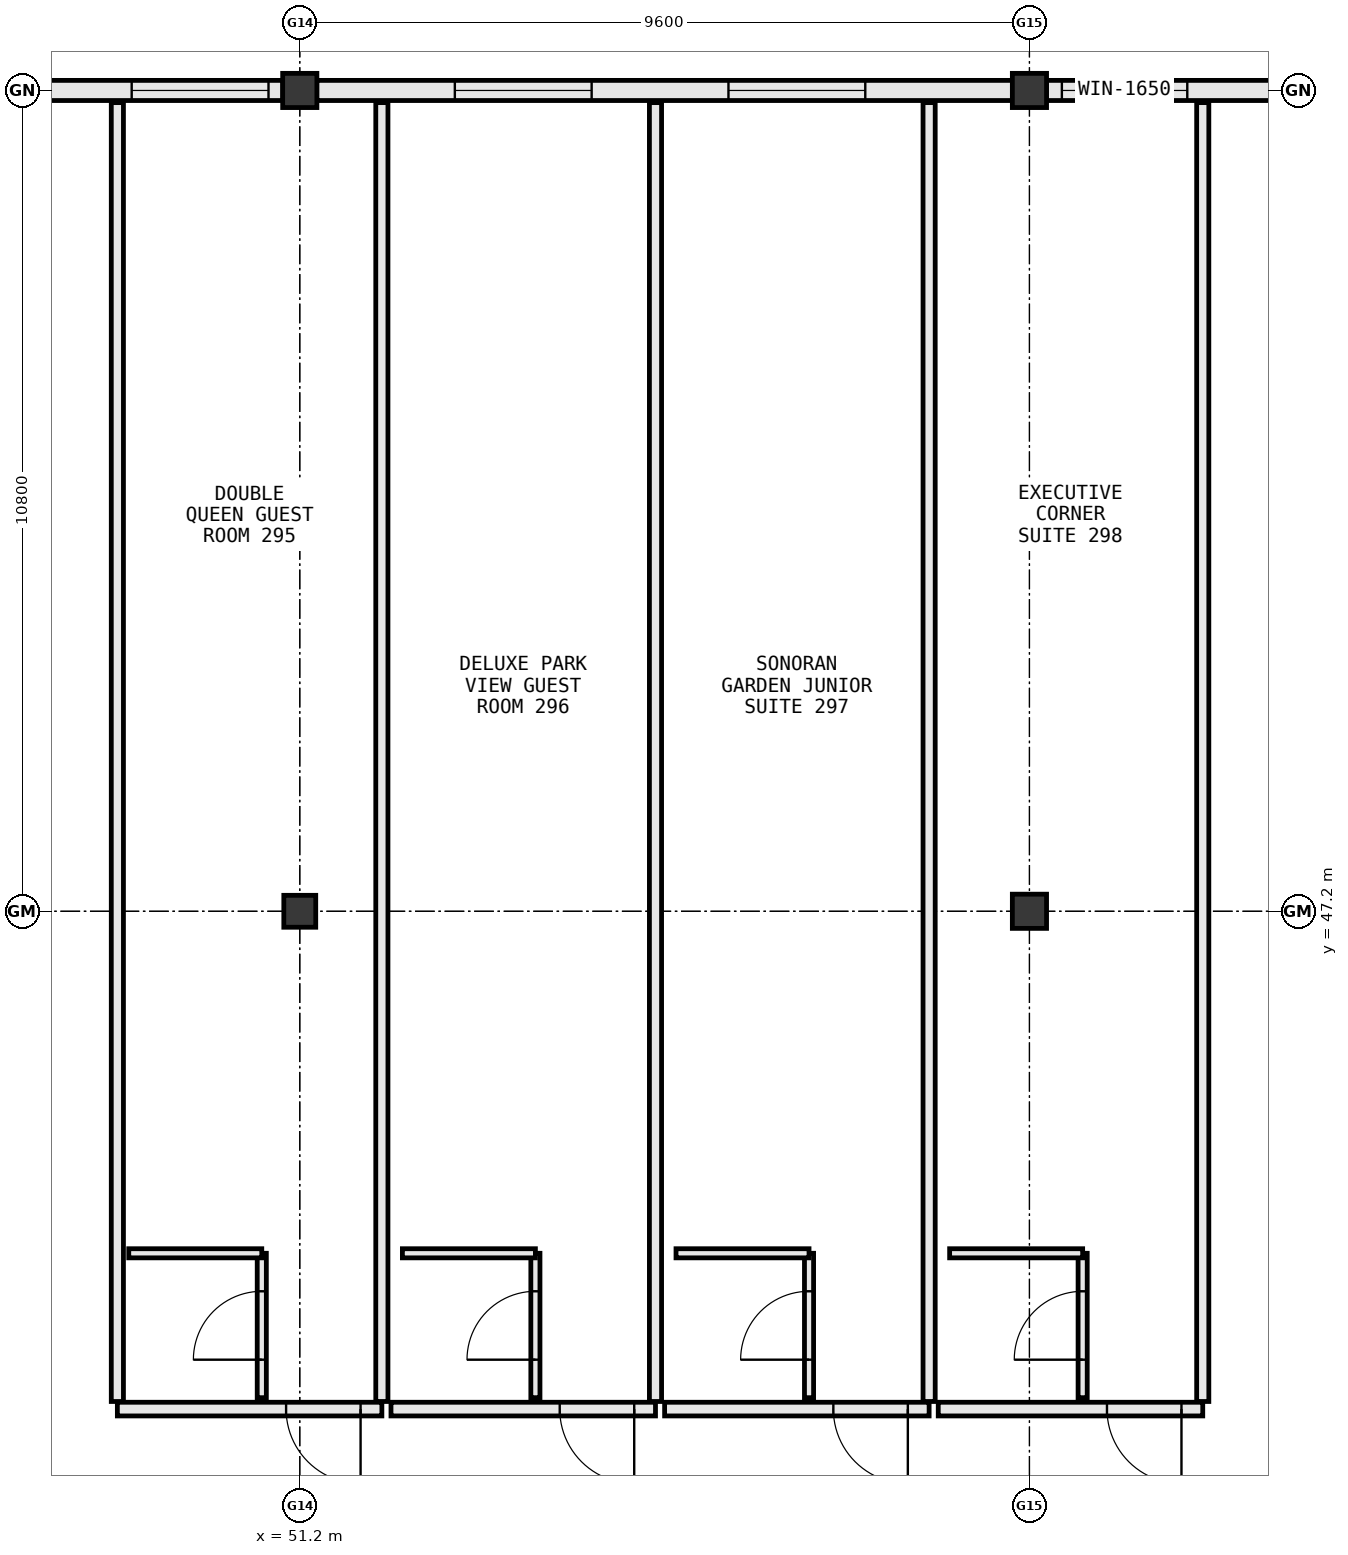
"""IFC4 building model, lengths in metres.
Left out: names, types, materials, properties, quantities, classifications, styles, units other than length and angle.
Written with IfcOpenShell. Run it as: python <this file> out.ifc"""

import sys

from ifc_helpers import new_model, si_unit, direction, frame, frame_2d, origin, origin_2d, place, context, subcontext, project, spatial, rectangle, extrude, element, fill, save


model = new_model("IFC4")
c1 = context("Model", 3, precision=1e-05, world=origin(), true_north=direction((0.0, 1.0)))
c2 = subcontext(c1, "Body", "Model", "MODEL_VIEW")
j1 = project(units=[si_unit("LENGTHUNIT", "METRE"), si_unit("PLANEANGLEUNIT", "RADIAN")], contexts=[c1])
p1 = place(None, origin())
s1 = spatial("IfcSite", under=j1, at=p1, CompositionType="ELEMENT")
p2 = place(p1, origin())
s2 = spatial("IfcBuilding", under=s1, at=p2, CompositionType="ELEMENT")
p3 = place(p2, frame((0.0, 0.0, 42.8)))
s3 = spatial("IfcBuildingStorey", under=s2, at=p3, CompositionType="ELEMENT", Elevation=42.8)
for number, where, z_axis, x_axis in (
    (1, (60.8, 47.2, 0.0), (0.0, 0.0, 1.0), (1.0, 0.0, 0.0)),
    (2, (60.8, 58.0, 0.0), (0.0, 0.0, 1.0), (1.0, 0.0, 0.0)),
):
    element("IfcColumn", number, at=place(p3, frame(where, z_axis=z_axis, x_axis=x_axis)), inside=s3, PredefinedType="COLUMN", context=c2, shape_type="SweptSolid", body=[
        extrude(rectangle(XDim=0.45, YDim=0.45, at=origin_2d()), origin(), (0.0, 0.0, 1.0), 3.8),
    ])
p4 = place(p3, frame((51.2, 47.2, 0.0), z_axis=(0.0, 0.0, 1.0), x_axis=(1.0, 0.0, 0.0)))
e3 = element("IfcColumn", 3, at=p4, inside=s3, PredefinedType="COLUMN", context=c2, shape_type="SweptSolid", body=[
    extrude(rectangle(XDim=0.42, YDim=0.42, at=origin_2d()), origin(), (0.0, 0.0, 1.0), 3.8),
])
p5 = place(p3, frame((51.2, 58.0, 0.0), z_axis=(0.0, 0.0, 1.0), x_axis=(1.0, 0.0, 0.0)))
e4 = element("IfcColumn", 4, at=p5, inside=s3, PredefinedType="COLUMN", context=c2, shape_type="SweptSolid", body=[
    extrude(rectangle(XDim=0.45, YDim=0.45, at=origin_2d()), origin(), (0.0, 0.0, 1.0), 3.8),
])
p6 = place(p3, frame((65.377, 58.0, 0.0), z_axis=(0.0, 0.0, 1.0), x_axis=(-1.0, 0.0, 0.0)))
e5 = element("IfcWall", 5, at=p6, inside=s3, PredefinedType="STANDARD", context=c2, shape_type="SweptSolid", body=[
    extrude(rectangle(XDim=4.354, YDim=0.265, at=frame_2d((2.177, 0.0))), origin(), (0.0, 0.0, 1.0), 2.855),
])
p7 = place(p6, frame((2.5, 0.0, 0.85)))
e6 = element("IfcOpeningElement", 6, at=p7, cuts=e5, PredefinedType="OPENING", context=c2, shape_type="SweptSolid", body=[
    extrude(rectangle(XDim=1.65, YDim=1.8, at=frame_2d((0.825, 0.9))), frame((0.0, 0.145, 0.0), z_axis=(0.0, -1.0, 0.0), x_axis=(1.0, 0.0, 0.0)), (0.0, 0.0, 1.0), 0.289),
])
p8 = place(p3, frame((60.577, 58.0, 0.0), z_axis=(0.0, 0.0, 1.0), x_axis=(-1.0, 0.0, 0.0)))
e7 = element("IfcWall", 7, at=p8, inside=s3, PredefinedType="STANDARD", context=c2, shape_type="SweptSolid", body=[
    extrude(rectangle(XDim=9.154, YDim=0.265, at=frame_2d((4.577, 0.0))), origin(), (0.0, 0.0, 1.0), 2.855),
])
p9 = place(p8, frame((5.537, 0.0, 0.85)))
e8 = element("IfcOpeningElement", 8, at=p9, cuts=e7, PredefinedType="OPENING", context=c2, shape_type="SweptSolid", body=[
    extrude(rectangle(XDim=1.8, YDim=1.85, at=frame_2d((0.9, 0.925))), frame((0.0, 0.145, 0.0), z_axis=(0.0, -1.0, 0.0), x_axis=(1.0, 0.0, 0.0)), (0.0, 0.0, 1.0), 0.289),
])
p10 = place(p8, frame((1.937, 0.0, 0.85)))
e9 = element("IfcOpeningElement", 9, at=p10, cuts=e7, PredefinedType="OPENING", context=c2, shape_type="SweptSolid", body=[
    extrude(rectangle(XDim=1.8, YDim=1.85, at=frame_2d((0.9, 0.925))), frame((0.0, 0.145, 0.0), z_axis=(0.0, -1.0, 0.0), x_axis=(1.0, 0.0, 0.0)), (0.0, 0.0, 1.0), 0.289),
])
p11 = place(p3, frame((50.977, 58.0, 0.0), z_axis=(0.0, 0.0, 1.0), x_axis=(-1.0, 0.0, 0.0)))
e10 = element("IfcWall", 10, at=p11, inside=s3, PredefinedType="STANDARD", context=c2, shape_type="SweptSolid", body=[
    extrude(rectangle(XDim=4.354, YDim=0.265, at=frame_2d((2.177, 0.0))), origin(), (0.0, 0.0, 1.0), 2.855),
])
p12 = place(p11, frame((0.188, 0.0, 0.85)))
e11 = element("IfcOpeningElement", 11, at=p12, cuts=e10, PredefinedType="OPENING", context=c2, shape_type="SweptSolid", body=[
    extrude(rectangle(XDim=1.8, YDim=1.85, at=frame_2d((0.9, 0.925))), frame((0.0, 0.145, 0.0), z_axis=(0.0, -1.0, 0.0), x_axis=(1.0, 0.0, 0.0)), (0.0, 0.0, 1.0), 0.289),
])
p13 = place(p3, frame((48.8, 40.65, 0.0), z_axis=(0.0, 0.0, 1.0), x_axis=(1.0, 0.0, 0.0)))
e12 = element("IfcWall", 12, at=p13, inside=s3, PredefinedType="PARTITIONING", context=c2, shape_type="SweptSolid", body=[
    extrude(rectangle(XDim=3.48, YDim=0.18, at=frame_2d((1.74, 0.0))), origin(), (0.0, 0.0, 1.0), 3.54),
])
p14 = place(p13, frame((2.22, 0.0, 0.0)))
e13 = element("IfcOpeningElement", 13, at=p14, cuts=e12, PredefinedType="OPENING", context=c2, shape_type="SweptSolid", body=[
    extrude(rectangle(XDim=0.98, YDim=2.18, at=frame_2d((0.49, 1.09))), frame((0.0, 0.102, 0.0), z_axis=(0.0, -1.0, 0.0), x_axis=(1.0, 0.0, 0.0)), (0.0, 0.0, 1.0), 0.204),
])
p15 = place(p3, frame((48.8, 40.75, 0.0), z_axis=(0.0, 0.0, 1.0), x_axis=(0.0, 1.0, 0.0)))
e14 = element("IfcWall", 14, at=p15, inside=s3, PredefinedType="PARTITIONING", context=c2, shape_type="SweptSolid", body=[
    extrude(rectangle(XDim=17.09, YDim=0.16, at=frame_2d((8.545, 0.0))), origin(), (0.0, 0.0, 1.0), 3.085),
])
p16 = place(p3, frame((52.28, 40.75, 0.0), z_axis=(0.0, 0.0, 1.0), x_axis=(0.0, 1.0, 0.0)))
e15 = element("IfcWall", 15, at=p16, inside=s3, PredefinedType="PARTITIONING", context=c2, shape_type="SweptSolid", body=[
    extrude(rectangle(XDim=17.09, YDim=0.16, at=frame_2d((8.545, 0.0))), origin(), (0.0, 0.0, 1.0), 3.54),
])
p17 = place(p3, frame((50.7, 40.8, 0.0), z_axis=(0.0, 0.0, 1.0), x_axis=(0.0, 1.0, 0.0)))
e16 = element("IfcWall", 16, at=p17, inside=s3, PredefinedType="PARTITIONING", context=c2, shape_type="SweptSolid", body=[
    extrude(rectangle(XDim=1.9, YDim=0.12, at=frame_2d((0.95, 0.0))), origin(), (0.0, 0.0, 1.0), 3.54),
])
p18 = place(p17, frame((0.5, 0.0, 0.0)))
e17 = element("IfcOpeningElement", 17, at=p18, cuts=e16, PredefinedType="OPENING", context=c2, shape_type="SweptSolid", body=[
    extrude(rectangle(XDim=0.9, YDim=2.15, at=frame_2d((0.45, 1.075))), frame((0.0, 0.072, 0.0), z_axis=(0.0, -1.0, 0.0), x_axis=(1.0, 0.0, 0.0)), (0.0, 0.0, 1.0), 0.144),
])
p19 = place(p3, frame((48.95, 42.7, 0.0), z_axis=(0.0, 0.0, 1.0), x_axis=(1.0, 0.0, 0.0)))
e18 = element("IfcWall", 18, at=p19, inside=s3, PredefinedType="PARTITIONING", context=c2, shape_type="SweptSolid", body=[
    extrude(rectangle(XDim=1.75, YDim=0.12, at=frame_2d((0.875, 0.0))), origin(), (0.0, 0.0, 1.0), 3.54),
])
p20 = place(p3, frame((52.4, 40.65, 0.0), z_axis=(0.0, 0.0, 1.0), x_axis=(1.0, 0.0, 0.0)))
e19 = element("IfcWall", 19, at=p20, inside=s3, PredefinedType="PARTITIONING", context=c2, shape_type="SweptSolid", body=[
    extrude(rectangle(XDim=3.48, YDim=0.18, at=frame_2d((1.74, 0.0))), origin(), (0.0, 0.0, 1.0), 3.54),
])
p21 = place(p20, frame((2.22, 0.0, 0.0)))
e20 = element("IfcOpeningElement", 20, at=p21, cuts=e19, PredefinedType="OPENING", context=c2, shape_type="SweptSolid", body=[
    extrude(rectangle(XDim=0.98, YDim=2.18, at=frame_2d((0.49, 1.09))), frame((0.0, 0.102, 0.0), z_axis=(0.0, -1.0, 0.0), x_axis=(1.0, 0.0, 0.0)), (0.0, 0.0, 1.0), 0.204),
])
p22 = place(p3, frame((55.88, 40.75, 0.0), z_axis=(0.0, 0.0, 1.0), x_axis=(0.0, 1.0, 0.0)))
e21 = element("IfcWall", 21, at=p22, inside=s3, PredefinedType="PARTITIONING", context=c2, shape_type="SweptSolid", body=[
    extrude(rectangle(XDim=17.09, YDim=0.16, at=frame_2d((8.545, 0.0))), origin(), (0.0, 0.0, 1.0), 3.54),
])
p23 = place(p3, frame((54.3, 40.8, 0.0), z_axis=(0.0, 0.0, 1.0), x_axis=(0.0, 1.0, 0.0)))
e22 = element("IfcWall", 22, at=p23, inside=s3, PredefinedType="PARTITIONING", context=c2, shape_type="SweptSolid", body=[
    extrude(rectangle(XDim=1.9, YDim=0.12, at=frame_2d((0.95, 0.0))), origin(), (0.0, 0.0, 1.0), 3.085),
])
p24 = place(p23, frame((0.5, 0.0, 0.0)))
e23 = element("IfcOpeningElement", 23, at=p24, cuts=e22, PredefinedType="OPENING", context=c2, shape_type="SweptSolid", body=[
    extrude(rectangle(XDim=0.9, YDim=2.15, at=frame_2d((0.45, 1.075))), frame((0.0, 0.072, 0.0), z_axis=(0.0, -1.0, 0.0), x_axis=(1.0, 0.0, 0.0)), (0.0, 0.0, 1.0), 0.144),
])
p25 = place(p3, frame((52.55, 42.7, 0.0), z_axis=(0.0, 0.0, 1.0), x_axis=(1.0, 0.0, 0.0)))
e24 = element("IfcWall", 24, at=p25, inside=s3, PredefinedType="PARTITIONING", context=c2, shape_type="SweptSolid", body=[
    extrude(rectangle(XDim=1.75, YDim=0.12, at=frame_2d((0.875, 0.0))), origin(), (0.0, 0.0, 1.0), 3.54),
])
p26 = place(p3, frame((56.0, 40.65, 0.0), z_axis=(0.0, 0.0, 1.0), x_axis=(1.0, 0.0, 0.0)))
e25 = element("IfcWall", 25, at=p26, inside=s3, PredefinedType="PARTITIONING", context=c2, shape_type="SweptSolid", body=[
    extrude(rectangle(XDim=3.48, YDim=0.18, at=frame_2d((1.74, 0.0))), origin(), (0.0, 0.0, 1.0), 3.54),
])
p27 = place(p26, frame((2.22, 0.0, 0.0)))
e26 = element("IfcOpeningElement", 26, at=p27, cuts=e25, PredefinedType="OPENING", context=c2, shape_type="SweptSolid", body=[
    extrude(rectangle(XDim=0.98, YDim=2.18, at=frame_2d((0.49, 1.09))), frame((0.0, 0.102, 0.0), z_axis=(0.0, -1.0, 0.0), x_axis=(1.0, 0.0, 0.0)), (0.0, 0.0, 1.0), 0.204),
])
p28 = place(p3, frame((59.48, 40.75, 0.0), z_axis=(0.0, 0.0, 1.0), x_axis=(0.0, 1.0, 0.0)))
e27 = element("IfcWall", 27, at=p28, inside=s3, PredefinedType="PARTITIONING", context=c2, shape_type="SweptSolid", body=[
    extrude(rectangle(XDim=17.09, YDim=0.16, at=frame_2d((8.545, 0.0))), origin(), (0.0, 0.0, 1.0), 3.54),
])
p29 = place(p3, frame((57.9, 40.8, 0.0), z_axis=(0.0, 0.0, 1.0), x_axis=(0.0, 1.0, 0.0)))
e28 = element("IfcWall", 28, at=p29, inside=s3, PredefinedType="PARTITIONING", context=c2, shape_type="SweptSolid", body=[
    extrude(rectangle(XDim=1.9, YDim=0.12, at=frame_2d((0.95, 0.0))), origin(), (0.0, 0.0, 1.0), 3.085),
])
p30 = place(p29, frame((0.5, 0.0, 0.0)))
e29 = element("IfcOpeningElement", 29, at=p30, cuts=e28, PredefinedType="OPENING", context=c2, shape_type="SweptSolid", body=[
    extrude(rectangle(XDim=0.9, YDim=2.15, at=frame_2d((0.45, 1.075))), frame((0.0, 0.072, 0.0), z_axis=(0.0, -1.0, 0.0), x_axis=(1.0, 0.0, 0.0)), (0.0, 0.0, 1.0), 0.144),
])
p31 = place(p3, frame((56.15, 42.7, 0.0), z_axis=(0.0, 0.0, 1.0), x_axis=(1.0, 0.0, 0.0)))
e30 = element("IfcWall", 30, at=p31, inside=s3, PredefinedType="PARTITIONING", context=c2, shape_type="SweptSolid", body=[
    extrude(rectangle(XDim=1.75, YDim=0.12, at=frame_2d((0.875, 0.0))), origin(), (0.0, 0.0, 1.0), 3.54),
])
p32 = place(p3, frame((59.6, 40.65, 0.0), z_axis=(0.0, 0.0, 1.0), x_axis=(1.0, 0.0, 0.0)))
e31 = element("IfcWall", 31, at=p32, inside=s3, PredefinedType="PARTITIONING", context=c2, shape_type="SweptSolid", body=[
    extrude(rectangle(XDim=3.48, YDim=0.18, at=frame_2d((1.74, 0.0))), origin(), (0.0, 0.0, 1.0), 3.54),
])
p33 = place(p32, frame((2.22, 0.0, 0.0)))
e32 = element("IfcOpeningElement", 32, at=p33, cuts=e31, PredefinedType="OPENING", context=c2, shape_type="SweptSolid", body=[
    extrude(rectangle(XDim=0.98, YDim=2.18, at=frame_2d((0.49, 1.09))), frame((0.0, 0.102, 0.0), z_axis=(0.0, -1.0, 0.0), x_axis=(1.0, 0.0, 0.0)), (0.0, 0.0, 1.0), 0.204),
])
p34 = place(p3, frame((63.08, 40.75, 0.0), z_axis=(0.0, 0.0, 1.0), x_axis=(0.0, 1.0, 0.0)))
e33 = element("IfcWall", 33, at=p34, inside=s3, PredefinedType="PARTITIONING", context=c2, shape_type="SweptSolid", body=[
    extrude(rectangle(XDim=17.09, YDim=0.16, at=frame_2d((8.545, 0.0))), origin(), (0.0, 0.0, 1.0), 3.54),
])
p35 = place(p3, frame((61.5, 40.8, 0.0), z_axis=(0.0, 0.0, 1.0), x_axis=(0.0, 1.0, 0.0)))
e34 = element("IfcWall", 34, at=p35, inside=s3, PredefinedType="PARTITIONING", context=c2, shape_type="SweptSolid", body=[
    extrude(rectangle(XDim=1.9, YDim=0.12, at=frame_2d((0.95, 0.0))), origin(), (0.0, 0.0, 1.0), 3.54),
])
p36 = place(p35, frame((0.5, 0.0, 0.0)))
e35 = element("IfcOpeningElement", 35, at=p36, cuts=e34, PredefinedType="OPENING", context=c2, shape_type="SweptSolid", body=[
    extrude(rectangle(XDim=0.9, YDim=2.15, at=frame_2d((0.45, 1.075))), frame((0.0, 0.072, 0.0), z_axis=(0.0, -1.0, 0.0), x_axis=(1.0, 0.0, 0.0)), (0.0, 0.0, 1.0), 0.144),
])
p37 = place(p3, frame((59.75, 42.7, 0.0), z_axis=(0.0, 0.0, 1.0), x_axis=(1.0, 0.0, 0.0)))
e36 = element("IfcWall", 36, at=p37, inside=s3, PredefinedType="PARTITIONING", context=c2, shape_type="SweptSolid", body=[
    extrude(rectangle(XDim=1.75, YDim=0.12, at=frame_2d((0.875, 0.0))), origin(), (0.0, 0.0, 1.0), 3.54),
])
p38 = place(p12, origin())
e37 = element("IfcWindow", 37, at=p38, inside=s3, PartitioningType="SINGLE_PANEL", PredefinedType="WINDOW", context=c2, shape_type="SweptSolid", body=[
    extrude(rectangle(XDim=1.8, YDim=1.85, at=frame_2d((0.9, 0.925))), frame((0.0, 0.03, 0.0), z_axis=(0.0, -1.0, 0.0), x_axis=(1.0, 0.0, 0.0)), (0.0, 0.0, 1.0), 0.06),
])
fill(e11, e37)
p39 = place(p9, origin())
e38 = element("IfcWindow", 38, at=p39, inside=s3, PartitioningType="SINGLE_PANEL", PredefinedType="WINDOW", context=c2, shape_type="SweptSolid", body=[
    extrude(rectangle(XDim=1.8, YDim=1.85, at=frame_2d((0.9, 0.925))), frame((0.0, 0.03, 0.0), z_axis=(0.0, -1.0, 0.0), x_axis=(1.0, 0.0, 0.0)), (0.0, 0.0, 1.0), 0.06),
])
fill(e8, e38)
p40 = place(p10, origin())
e39 = element("IfcWindow", 39, at=p40, inside=s3, PartitioningType="SINGLE_PANEL", PredefinedType="WINDOW", context=c2, shape_type="SweptSolid", body=[
    extrude(rectangle(XDim=1.8, YDim=1.85, at=frame_2d((0.9, 0.925))), frame((0.0, 0.03, 0.0), z_axis=(0.0, -1.0, 0.0), x_axis=(1.0, 0.0, 0.0)), (0.0, 0.0, 1.0), 0.06),
])
fill(e9, e39)
p41 = place(p7, origin())
e40 = element("IfcWindow", 40, at=p41, inside=s3, PartitioningType="SINGLE_PANEL", PredefinedType="WINDOW", context=c2, shape_type="SweptSolid", body=[
    extrude(rectangle(XDim=1.65, YDim=1.8, at=frame_2d((0.825, 0.9))), frame((0.0, 0.03, 0.0), z_axis=(0.0, -1.0, 0.0), x_axis=(1.0, 0.0, 0.0)), (0.0, 0.0, 1.0), 0.06),
])
fill(e6, e40)
p42 = place(p14, frame((0.98, 0.0, 0.0), z_axis=(0.0, 0.0, 1.0), x_axis=(-1.0, 0.0, 0.0)))
e41 = element("IfcDoor", 41, at=p42, inside=s3, OperationType="SINGLE_SWING_RIGHT", PredefinedType="DOOR", context=c2, shape_type="SweptSolid", body=[
    extrude(rectangle(XDim=0.98, YDim=2.18, at=frame_2d((0.49, 1.09))), frame((0.0, 0.025, 0.0), z_axis=(0.0, -1.0, 0.0), x_axis=(1.0, 0.0, 0.0)), (0.0, 0.0, 1.0), 0.05),
])
fill(e13, e41)
p43 = place(p18, origin())
e42 = element("IfcDoor", 42, at=p43, inside=s3, OperationType="SINGLE_SWING_LEFT", PredefinedType="DOOR", context=c2, shape_type="SweptSolid", body=[
    extrude(rectangle(XDim=0.9, YDim=2.15, at=frame_2d((0.45, 1.075))), frame((0.0, 0.025, 0.0), z_axis=(0.0, -1.0, 0.0), x_axis=(1.0, 0.0, 0.0)), (0.0, 0.0, 1.0), 0.05),
])
fill(e17, e42)
p44 = place(p21, frame((0.98, 0.0, 0.0), z_axis=(0.0, 0.0, 1.0), x_axis=(-1.0, 0.0, 0.0)))
e43 = element("IfcDoor", 43, at=p44, inside=s3, OperationType="SINGLE_SWING_RIGHT", PredefinedType="DOOR", context=c2, shape_type="SweptSolid", body=[
    extrude(rectangle(XDim=0.98, YDim=2.18, at=frame_2d((0.49, 1.09))), frame((0.0, 0.025, 0.0), z_axis=(0.0, -1.0, 0.0), x_axis=(1.0, 0.0, 0.0)), (0.0, 0.0, 1.0), 0.05),
])
fill(e20, e43)
p45 = place(p24, origin())
e44 = element("IfcDoor", 44, at=p45, inside=s3, OperationType="SINGLE_SWING_LEFT", PredefinedType="DOOR", context=c2, shape_type="SweptSolid", body=[
    extrude(rectangle(XDim=0.9, YDim=2.15, at=frame_2d((0.45, 1.075))), frame((0.0, 0.025, 0.0), z_axis=(0.0, -1.0, 0.0), x_axis=(1.0, 0.0, 0.0)), (0.0, 0.0, 1.0), 0.05),
])
fill(e23, e44)
p46 = place(p27, frame((0.98, 0.0, 0.0), z_axis=(0.0, 0.0, 1.0), x_axis=(-1.0, 0.0, 0.0)))
e45 = element("IfcDoor", 45, at=p46, inside=s3, OperationType="SINGLE_SWING_RIGHT", PredefinedType="DOOR", context=c2, shape_type="SweptSolid", body=[
    extrude(rectangle(XDim=0.98, YDim=2.18, at=frame_2d((0.49, 1.09))), frame((0.0, 0.025, 0.0), z_axis=(0.0, -1.0, 0.0), x_axis=(1.0, 0.0, 0.0)), (0.0, 0.0, 1.0), 0.05),
])
fill(e26, e45)
p47 = place(p30, origin())
e46 = element("IfcDoor", 46, at=p47, inside=s3, OperationType="SINGLE_SWING_LEFT", PredefinedType="DOOR", context=c2, shape_type="SweptSolid", body=[
    extrude(rectangle(XDim=0.9, YDim=2.15, at=frame_2d((0.45, 1.075))), frame((0.0, 0.025, 0.0), z_axis=(0.0, -1.0, 0.0), x_axis=(1.0, 0.0, 0.0)), (0.0, 0.0, 1.0), 0.05),
])
fill(e29, e46)
p48 = place(p33, frame((0.98, 0.0, 0.0), z_axis=(0.0, 0.0, 1.0), x_axis=(-1.0, 0.0, 0.0)))
e47 = element("IfcDoor", 47, at=p48, inside=s3, OperationType="SINGLE_SWING_RIGHT", PredefinedType="DOOR", context=c2, shape_type="SweptSolid", body=[
    extrude(rectangle(XDim=0.98, YDim=2.18, at=frame_2d((0.49, 1.09))), frame((0.0, 0.025, 0.0), z_axis=(0.0, -1.0, 0.0), x_axis=(1.0, 0.0, 0.0)), (0.0, 0.0, 1.0), 0.05),
])
fill(e32, e47)
p49 = place(p36, origin())
e48 = element("IfcDoor", 48, at=p49, inside=s3, OperationType="SINGLE_SWING_LEFT", PredefinedType="DOOR", context=c2, shape_type="SweptSolid", body=[
    extrude(rectangle(XDim=0.9, YDim=2.15, at=frame_2d((0.45, 1.075))), frame((0.0, 0.025, 0.0), z_axis=(0.0, -1.0, 0.0), x_axis=(1.0, 0.0, 0.0)), (0.0, 0.0, 1.0), 0.05),
])
fill(e35, e48)
save(model, sys.argv[1])
